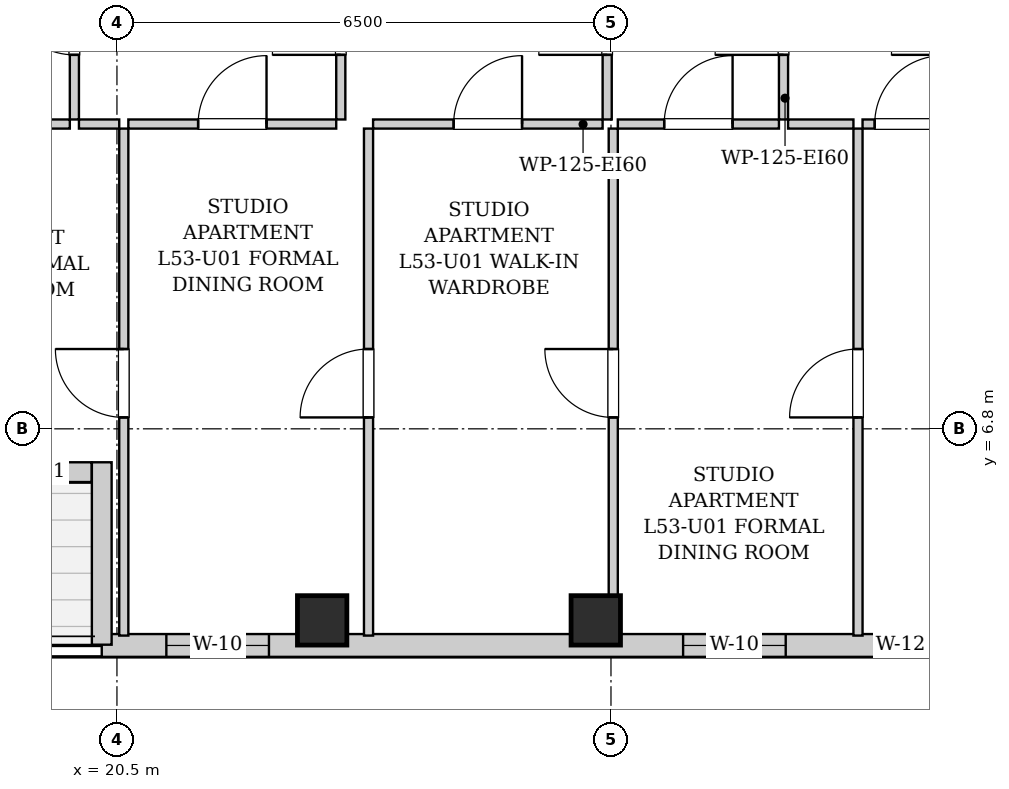
"""IFC4 building model, lengths in metres.
Left out: names, types, materials, properties, quantities, classifications, styles, units other than length and angle.
Written with IfcOpenShell. Run it as: python <this file> out.ifc"""

import sys

from ifc_helpers import new_model, si_unit, direction, frame, frame_2d, origin, origin_2d, place, context, subcontext, project, spatial, rectangle, extrude, element, fill, save


model = new_model("IFC4")
c1 = context("Model", 3, precision=1e-05, world=origin(), true_north=direction((0.0, 1.0)))
c2 = subcontext(c1, "Body", "Model", "MODEL_VIEW")
j1 = project(units=[si_unit("LENGTHUNIT", "METRE"), si_unit("PLANEANGLEUNIT", "RADIAN")], contexts=[c1])
p1 = place(None, origin())
s1 = spatial("IfcSite", under=j1, at=p1, CompositionType="ELEMENT")
p2 = place(p1, origin())
s2 = spatial("IfcBuilding", under=s1, at=p2, CompositionType="ELEMENT")
p3 = place(p2, frame((0.0, 0.0, 184.3)))
s3 = spatial("IfcBuildingStorey", under=s2, at=p3, CompositionType="ELEMENT", Elevation=184.3)
for number, where, z_axis, x_axis in (
    (1, (23.2, 4.28, 0.0), (0.0, 0.0, 1.0), (1.0, 0.0, 0.0)),
    (2, (26.8, 4.28, 0.0), (0.0, 0.0, 1.0), (1.0, 0.0, 0.0)),
):
    element("IfcColumn", number, at=place(p3, frame(where, z_axis=z_axis, x_axis=x_axis)), inside=s3, PredefinedType="COLUMN", context=c2, shape_type="SweptSolid", body=[
        extrude(rectangle(XDim=0.65, YDim=0.65, at=origin_2d()), origin(), (0.0, 0.0, 1.0), 3.3),
    ])
p4 = place(p3, frame((31.5, 3.95, 0.0), z_axis=(0.0, 0.0, 1.0), x_axis=(-1.0, 0.0, 0.0)))
e3 = element("IfcWall", 3, at=p4, inside=s3, PredefinedType="SOLIDWALL", context=c2, shape_type="SweptSolid", body=[
    extrude(rectangle(XDim=11.2, YDim=0.3, at=frame_2d((5.6, 0.0))), origin(), (0.0, 0.0, 1.0), 3.04),
])
p5 = place(p4, frame((9.0, 0.0, 0.55)))
e4 = element("IfcOpeningElement", 4, at=p5, cuts=e3, PredefinedType="OPENING", context=c2, shape_type="SweptSolid", body=[
    extrude(rectangle(XDim=1.35, YDim=1.2, at=frame_2d((0.675, 0.6))), frame((0.0, 0.16, 0.0), z_axis=(0.0, -1.0, 0.0), x_axis=(1.0, 0.0, 0.0)), (0.0, 0.0, 1.0), 0.32),
])
p6 = place(p4, frame((2.201, 0.0, 0.55)))
e5 = element("IfcOpeningElement", 5, at=p6, cuts=e3, PredefinedType="OPENING", context=c2, shape_type="SweptSolid", body=[
    extrude(rectangle(XDim=1.35, YDim=1.2, at=frame_2d((0.675, 0.6))), frame((0.0, 0.16, 0.0), z_axis=(0.0, -1.0, 0.0), x_axis=(1.0, 0.0, 0.0)), (0.0, 0.0, 1.0), 0.32),
])
p7 = place(p4, frame((0.35, 0.0, 0.55)))
e6 = element("IfcOpeningElement", 6, at=p7, cuts=e3, PredefinedType="OPENING", context=c2, shape_type="SweptSolid", body=[
    extrude(rectangle(XDim=0.68, YDim=1.2, at=frame_2d((0.34, 0.6))), frame((0.0, 0.16, 0.0), z_axis=(0.0, -1.0, 0.0), x_axis=(1.0, 0.0, 0.0)), (0.0, 0.0, 1.0), 0.32),
])
p8 = place(p3, frame((20.3, 3.96, 0.0), z_axis=(0.0, 0.0, 1.0), x_axis=(0.0, 1.0, 0.0)))
e7 = element("IfcWall", 7, at=p8, inside=s3, PredefinedType="SOLIDWALL", context=c2, shape_type="SweptSolid", body=[
    extrude(rectangle(XDim=2.4, YDim=0.26, at=frame_2d((1.2, 0.0))), origin(), (0.0, 0.0, 1.0), 3.04),
])
p9 = place(p3, frame((20.166, 6.23, 0.0), z_axis=(0.0, 0.0, 1.0), x_axis=(-1.0, 0.0, 0.0)))
e8 = element("IfcWall", 8, at=p9, inside=s3, PredefinedType="SOLIDWALL", context=c2, shape_type="SweptSolid", body=[
    extrude(rectangle(XDim=4.332, YDim=0.26, at=frame_2d((2.166, 0.0))), origin(), (0.0, 0.0, 1.0), 3.04),
])
p10 = place(p9, frame((1.556, 0.0, 0.0)))
e9 = element("IfcOpeningElement", 9, at=p10, cuts=e8, PredefinedType="OPENING", context=c2, shape_type="SweptSolid", body=[
    extrude(rectangle(XDim=1.1, YDim=2.0, at=frame_2d((0.55, 1.0))), frame((0.0, 0.14, 0.0), z_axis=(0.0, -1.0, 0.0), x_axis=(1.0, 0.0, 0.0)), (0.0, 0.0, 1.0), 0.28),
])
p11 = place(p9, frame((0.546, 0.0, 0.55)))
e10 = element("IfcOpeningElement", 10, at=p11, cuts=e8, PredefinedType="OPENING", context=c2, shape_type="SweptSolid", body=[
    extrude(rectangle(XDim=0.85, YDim=1.2, at=frame_2d((0.425, 0.6))), frame((0.0, 0.14, 0.0), z_axis=(0.0, -1.0, 0.0), x_axis=(1.0, 0.0, 0.0)), (0.0, 0.0, 1.0), 0.28),
])
p12 = place(p3, frame((19.94, 10.87, 0.0), z_axis=(0.0, 0.0, 1.0), x_axis=(0.0, 1.0, 0.0)))
e11 = element("IfcWall", 11, at=p12, inside=s3, PredefinedType="PARTITIONING", context=c2, shape_type="SweptSolid", body=[
    extrude(rectangle(XDim=2.6, YDim=0.12, at=frame_2d((1.3, 0.0))), origin(), (0.0, 0.0, 1.0), 3.04),
])
p13 = place(p12, frame((0.85, 0.0, 0.0)))
e12 = element("IfcOpeningElement", 12, at=p13, cuts=e11, PredefinedType="OPENING", context=c2, shape_type="SweptSolid", body=[
    extrude(rectangle(XDim=0.9, YDim=2.05, at=frame_2d((0.45, 1.025))), frame((0.0, 0.07, 0.0), z_axis=(0.0, -1.0, 0.0), x_axis=(1.0, 0.0, 0.0)), (0.0, 0.0, 1.0), 0.14),
])
p14 = place(p3, frame((17.43, 10.81, 0.0), z_axis=(0.0, 0.0, 1.0), x_axis=(1.0, 0.0, 0.0)))
e13 = element("IfcWall", 13, at=p14, inside=s3, PredefinedType="PARTITIONING", context=c2, shape_type="SweptSolid", body=[
    extrude(rectangle(XDim=2.45, YDim=0.12, at=frame_2d((1.225, 0.0))), origin(), (0.0, 0.0, 1.0), 3.04),
])
p15 = place(p14, frame((0.775, 0.0, 0.0)))
e14 = element("IfcOpeningElement", 14, at=p15, cuts=e13, PredefinedType="OPENING", context=c2, shape_type="SweptSolid", body=[
    extrude(rectangle(XDim=0.9, YDim=2.05, at=frame_2d((0.45, 1.025))), frame((0.0, 0.07, 0.0), z_axis=(0.0, -1.0, 0.0), x_axis=(1.0, 0.0, 0.0)), (0.0, 0.0, 1.0), 0.14),
])
p16 = place(p3, frame((23.445, 10.87, 0.0), z_axis=(0.0, 0.0, 1.0), x_axis=(0.0, 1.0, 0.0)))
e15 = element("IfcWall", 15, at=p16, inside=s3, PredefinedType="PARTITIONING", context=c2, shape_type="SweptSolid", body=[
    extrude(rectangle(XDim=2.6, YDim=0.12, at=frame_2d((1.3, 0.0))), origin(), (0.0, 0.0, 1.0), 3.04),
])
p17 = place(p16, frame((0.85, 0.0, 0.0)))
e16 = element("IfcOpeningElement", 16, at=p17, cuts=e15, PredefinedType="OPENING", context=c2, shape_type="SweptSolid", body=[
    extrude(rectangle(XDim=0.9, YDim=2.05, at=frame_2d((0.45, 1.025))), frame((0.0, 0.07, 0.0), z_axis=(0.0, -1.0, 0.0), x_axis=(1.0, 0.0, 0.0)), (0.0, 0.0, 1.0), 0.14),
])
p18 = place(p3, frame((20.0, 10.81, 0.0), z_axis=(0.0, 0.0, 1.0), x_axis=(1.0, 0.0, 0.0)))
e17 = element("IfcWall", 17, at=p18, inside=s3, PredefinedType="PARTITIONING", context=c2, shape_type="SweptSolid", body=[
    extrude(rectangle(XDim=0.53, YDim=0.12, at=frame_2d((0.265, 0.0))), origin(), (0.0, 0.0, 1.0), 3.04),
])
p19 = place(p3, frame((20.65, 10.81, 0.0), z_axis=(0.0, 0.0, 1.0), x_axis=(1.0, 0.0, 0.0)))
e18 = element("IfcWall", 18, at=p19, inside=s3, PredefinedType="PARTITIONING", context=c2, shape_type="SweptSolid", body=[
    extrude(rectangle(XDim=2.735, YDim=0.12, at=frame_2d((1.368, 0.0))), origin(), (0.0, 0.0, 1.0), 3.04),
])
p20 = place(p19, frame((0.918, 0.0, 0.0)))
e19 = element("IfcOpeningElement", 19, at=p20, cuts=e18, PredefinedType="OPENING", context=c2, shape_type="SweptSolid", body=[
    extrude(rectangle(XDim=0.9, YDim=2.05, at=frame_2d((0.45, 1.025))), frame((0.0, 0.07, 0.0), z_axis=(0.0, -1.0, 0.0), x_axis=(1.0, 0.0, 0.0)), (0.0, 0.0, 1.0), 0.14),
])
p21 = place(p3, frame((26.95, 10.87, 0.0), z_axis=(0.0, 0.0, 1.0), x_axis=(0.0, 1.0, 0.0)))
e20 = element("IfcWall", 20, at=p21, inside=s3, PredefinedType="PARTITIONING", context=c2, shape_type="SweptSolid", body=[
    extrude(rectangle(XDim=2.6, YDim=0.12, at=frame_2d((1.3, 0.0))), origin(), (0.0, 0.0, 1.0), 3.04),
])
p22 = place(p21, frame((0.85, 0.0, 0.0)))
e21 = element("IfcOpeningElement", 21, at=p22, cuts=e20, PredefinedType="OPENING", context=c2, shape_type="SweptSolid", body=[
    extrude(rectangle(XDim=0.9, YDim=2.05, at=frame_2d((0.45, 1.025))), frame((0.0, 0.07, 0.0), z_axis=(0.0, -1.0, 0.0), x_axis=(1.0, 0.0, 0.0)), (0.0, 0.0, 1.0), 0.14),
])
p23 = place(p3, frame((23.87, 10.81, 0.0), z_axis=(0.0, 0.0, 1.0), x_axis=(1.0, 0.0, 0.0)))
e22 = element("IfcWall", 22, at=p23, inside=s3, PredefinedType="PARTITIONING", context=c2, shape_type="SweptSolid", body=[
    extrude(rectangle(XDim=3.02, YDim=0.12, at=frame_2d((1.51, 0.0))), origin(), (0.0, 0.0, 1.0), 3.04),
])
p24 = place(p23, frame((1.06, 0.0, 0.0)))
e23 = element("IfcOpeningElement", 23, at=p24, cuts=e22, PredefinedType="OPENING", context=c2, shape_type="SweptSolid", body=[
    extrude(rectangle(XDim=0.9, YDim=2.05, at=frame_2d((0.45, 1.025))), frame((0.0, 0.07, 0.0), z_axis=(0.0, -1.0, 0.0), x_axis=(1.0, 0.0, 0.0)), (0.0, 0.0, 1.0), 0.14),
])
p25 = place(p3, frame((29.27, 10.87, 0.0), z_axis=(0.0, 0.0, 1.0), x_axis=(0.0, 1.0, 0.0)))
e24 = element("IfcWall", 24, at=p25, inside=s3, PredefinedType="PARTITIONING", context=c2, shape_type="SweptSolid", body=[
    extrude(rectangle(XDim=2.6, YDim=0.12, at=frame_2d((1.3, 0.0))), origin(), (0.0, 0.0, 1.0), 3.04),
])
p26 = place(p25, frame((0.85, 0.0, 0.0)))
e25 = element("IfcOpeningElement", 25, at=p26, cuts=e24, PredefinedType="OPENING", context=c2, shape_type="SweptSolid", body=[
    extrude(rectangle(XDim=0.9, YDim=2.05, at=frame_2d((0.45, 1.025))), frame((0.0, 0.07, 0.0), z_axis=(0.0, -1.0, 0.0), x_axis=(1.0, 0.0, 0.0)), (0.0, 0.0, 1.0), 0.14),
])
p27 = place(p3, frame((27.09, 10.81, 0.0), z_axis=(0.0, 0.0, 1.0), x_axis=(1.0, 0.0, 0.0)))
e26 = element("IfcWall", 26, at=p27, inside=s3, PredefinedType="PARTITIONING", context=c2, shape_type="SweptSolid", body=[
    extrude(rectangle(XDim=2.12, YDim=0.12, at=frame_2d((1.06, 0.0))), origin(), (0.0, 0.0, 1.0), 3.04),
])
p28 = place(p27, frame((0.61, 0.0, 0.0)))
e27 = element("IfcOpeningElement", 27, at=p28, cuts=e26, PredefinedType="OPENING", context=c2, shape_type="SweptSolid", body=[
    extrude(rectangle(XDim=0.9, YDim=2.05, at=frame_2d((0.45, 1.025))), frame((0.0, 0.07, 0.0), z_axis=(0.0, -1.0, 0.0), x_axis=(1.0, 0.0, 0.0)), (0.0, 0.0, 1.0), 0.14),
])
p29 = place(p3, frame((29.33, 10.81, 0.0), z_axis=(0.0, 0.0, 1.0), x_axis=(1.0, 0.0, 0.0)))
e28 = element("IfcWall", 28, at=p29, inside=s3, PredefinedType="PARTITIONING", context=c2, shape_type="SweptSolid", body=[
    extrude(rectangle(XDim=0.86, YDim=0.12, at=frame_2d((0.43, 0.0))), origin(), (0.0, 0.0, 1.0), 3.04),
])
p30 = place(p3, frame((30.31, 10.81, 0.0), z_axis=(0.0, 0.0, 1.0), x_axis=(1.0, 0.0, 0.0)))
e29 = element("IfcWall", 29, at=p30, inside=s3, PredefinedType="PARTITIONING", context=c2, shape_type="SweptSolid", body=[
    extrude(rectangle(XDim=1.22, YDim=0.12, at=frame_2d((0.61, 0.0))), origin(), (0.0, 0.0, 1.0), 3.04),
])
p31 = place(p30, frame((0.16, 0.0, 0.0)))
e30 = element("IfcOpeningElement", 30, at=p31, cuts=e29, PredefinedType="OPENING", context=c2, shape_type="SweptSolid", body=[
    extrude(rectangle(XDim=0.9, YDim=2.05, at=frame_2d((0.45, 1.025))), frame((0.0, 0.07, 0.0), z_axis=(0.0, -1.0, 0.0), x_axis=(1.0, 0.0, 0.0)), (0.0, 0.0, 1.0), 0.14),
])
p32 = place(p3, frame((20.59, 4.08, 0.0), z_axis=(0.0, 0.0, 1.0), x_axis=(0.0, 1.0, 0.0)))
e31 = element("IfcWall", 31, at=p32, inside=s3, PredefinedType="PARTITIONING", context=c2, shape_type="SweptSolid", body=[
    extrude(rectangle(XDim=6.67, YDim=0.12, at=frame_2d((3.335, 0.0))), origin(), (0.0, 0.0, 1.0), 3.04),
])
p33 = place(p32, frame((2.87, 0.0, 0.0)))
e32 = element("IfcOpeningElement", 32, at=p33, cuts=e31, PredefinedType="OPENING", context=c2, shape_type="SweptSolid", body=[
    extrude(rectangle(XDim=0.9, YDim=2.05, at=frame_2d((0.45, 1.025))), frame((0.0, 0.07, 0.0), z_axis=(0.0, -1.0, 0.0), x_axis=(1.0, 0.0, 0.0)), (0.0, 0.0, 1.0), 0.14),
])
p34 = place(p3, frame((23.81, 4.08, 0.0), z_axis=(0.0, 0.0, 1.0), x_axis=(0.0, 1.0, 0.0)))
e33 = element("IfcWall", 33, at=p34, inside=s3, PredefinedType="PARTITIONING", context=c2, shape_type="SweptSolid", body=[
    extrude(rectangle(XDim=6.67, YDim=0.12, at=frame_2d((3.335, 0.0))), origin(), (0.0, 0.0, 1.0), 3.04),
])
p35 = place(p34, frame((2.87, 0.0, 0.0)))
e34 = element("IfcOpeningElement", 34, at=p35, cuts=e33, PredefinedType="OPENING", context=c2, shape_type="SweptSolid", body=[
    extrude(rectangle(XDim=0.9, YDim=2.05, at=frame_2d((0.45, 1.025))), frame((0.0, 0.07, 0.0), z_axis=(0.0, -1.0, 0.0), x_axis=(1.0, 0.0, 0.0)), (0.0, 0.0, 1.0), 0.14),
])
p36 = place(p3, frame((27.03, 4.08, 0.0), z_axis=(0.0, 0.0, 1.0), x_axis=(0.0, 1.0, 0.0)))
e35 = element("IfcWall", 35, at=p36, inside=s3, PredefinedType="PARTITIONING", context=c2, shape_type="SweptSolid", body=[
    extrude(rectangle(XDim=6.67, YDim=0.12, at=frame_2d((3.335, 0.0))), origin(), (0.0, 0.0, 1.0), 3.04),
])
p37 = place(p36, frame((2.87, 0.0, 0.0)))
e36 = element("IfcOpeningElement", 36, at=p37, cuts=e35, PredefinedType="OPENING", context=c2, shape_type="SweptSolid", body=[
    extrude(rectangle(XDim=0.9, YDim=2.05, at=frame_2d((0.45, 1.025))), frame((0.0, 0.07, 0.0), z_axis=(0.0, -1.0, 0.0), x_axis=(1.0, 0.0, 0.0)), (0.0, 0.0, 1.0), 0.14),
])
p38 = place(p3, frame((30.25, 4.08, 0.0), z_axis=(0.0, 0.0, 1.0), x_axis=(0.0, 1.0, 0.0)))
e37 = element("IfcWall", 37, at=p38, inside=s3, PredefinedType="PARTITIONING", context=c2, shape_type="SweptSolid", body=[
    extrude(rectangle(XDim=6.67, YDim=0.12, at=frame_2d((3.335, 0.0))), origin(), (0.0, 0.0, 1.0), 3.04),
])
p39 = place(p38, frame((2.87, 0.0, 0.0)))
e38 = element("IfcOpeningElement", 38, at=p39, cuts=e37, PredefinedType="OPENING", context=c2, shape_type="SweptSolid", body=[
    extrude(rectangle(XDim=0.9, YDim=2.05, at=frame_2d((0.45, 1.025))), frame((0.0, 0.07, 0.0), z_axis=(0.0, -1.0, 0.0), x_axis=(1.0, 0.0, 0.0)), (0.0, 0.0, 1.0), 0.14),
])
p40 = place(p13, origin())
e39 = element("IfcDoor", 39, at=p40, inside=s3, OperationType="SINGLE_SWING_RIGHT", PredefinedType="DOOR", context=c2, shape_type="SweptSolid", body=[
    extrude(rectangle(XDim=0.9, YDim=2.05, at=frame_2d((0.45, 1.025))), frame((0.0, 0.025, 0.0), z_axis=(0.0, -1.0, 0.0), x_axis=(1.0, 0.0, 0.0)), (0.0, 0.0, 1.0), 0.05),
])
fill(e12, e39)
p41 = place(p17, origin())
e40 = element("IfcDoor", 40, at=p41, inside=s3, OperationType="SINGLE_SWING_LEFT", PredefinedType="DOOR", context=c2, shape_type="SweptSolid", body=[
    extrude(rectangle(XDim=0.9, YDim=2.05, at=frame_2d((0.45, 1.025))), frame((0.0, 0.025, 0.0), z_axis=(0.0, -1.0, 0.0), x_axis=(1.0, 0.0, 0.0)), (0.0, 0.0, 1.0), 0.05),
])
fill(e16, e40)
p42 = place(p20, origin())
e41 = element("IfcDoor", 41, at=p42, inside=s3, OperationType="SINGLE_SWING_RIGHT", PredefinedType="DOOR", context=c2, shape_type="SweptSolid", body=[
    extrude(rectangle(XDim=0.9, YDim=2.05, at=frame_2d((0.45, 1.025))), frame((0.0, 0.025, 0.0), z_axis=(0.0, -1.0, 0.0), x_axis=(1.0, 0.0, 0.0)), (0.0, 0.0, 1.0), 0.05),
])
fill(e19, e41)
p43 = place(p22, origin())
e42 = element("IfcDoor", 42, at=p43, inside=s3, OperationType="SINGLE_SWING_LEFT", PredefinedType="DOOR", context=c2, shape_type="SweptSolid", body=[
    extrude(rectangle(XDim=0.9, YDim=2.05, at=frame_2d((0.45, 1.025))), frame((0.0, 0.025, 0.0), z_axis=(0.0, -1.0, 0.0), x_axis=(1.0, 0.0, 0.0)), (0.0, 0.0, 1.0), 0.05),
])
fill(e21, e42)
p44 = place(p24, origin())
e43 = element("IfcDoor", 43, at=p44, inside=s3, OperationType="SINGLE_SWING_RIGHT", PredefinedType="DOOR", context=c2, shape_type="SweptSolid", body=[
    extrude(rectangle(XDim=0.9, YDim=2.05, at=frame_2d((0.45, 1.025))), frame((0.0, 0.025, 0.0), z_axis=(0.0, -1.0, 0.0), x_axis=(1.0, 0.0, 0.0)), (0.0, 0.0, 1.0), 0.05),
])
fill(e23, e43)
p45 = place(p26, origin())
e44 = element("IfcDoor", 44, at=p45, inside=s3, OperationType="SINGLE_SWING_LEFT", PredefinedType="DOOR", context=c2, shape_type="SweptSolid", body=[
    extrude(rectangle(XDim=0.9, YDim=2.05, at=frame_2d((0.45, 1.025))), frame((0.0, 0.025, 0.0), z_axis=(0.0, -1.0, 0.0), x_axis=(1.0, 0.0, 0.0)), (0.0, 0.0, 1.0), 0.05),
])
fill(e25, e44)
p46 = place(p28, origin())
e45 = element("IfcDoor", 45, at=p46, inside=s3, OperationType="SINGLE_SWING_RIGHT", PredefinedType="DOOR", context=c2, shape_type="SweptSolid", body=[
    extrude(rectangle(XDim=0.9, YDim=2.05, at=frame_2d((0.45, 1.025))), frame((0.0, 0.025, 0.0), z_axis=(0.0, -1.0, 0.0), x_axis=(1.0, 0.0, 0.0)), (0.0, 0.0, 1.0), 0.05),
])
fill(e27, e45)
p47 = place(p31, origin())
e46 = element("IfcDoor", 46, at=p47, inside=s3, OperationType="SINGLE_SWING_RIGHT", PredefinedType="DOOR", context=c2, shape_type="SweptSolid", body=[
    extrude(rectangle(XDim=0.9, YDim=2.05, at=frame_2d((0.45, 1.025))), frame((0.0, 0.025, 0.0), z_axis=(0.0, -1.0, 0.0), x_axis=(1.0, 0.0, 0.0)), (0.0, 0.0, 1.0), 0.05),
])
fill(e30, e46)
p48 = place(p33, origin())
e47 = element("IfcDoor", 47, at=p48, inside=s3, OperationType="SINGLE_SWING_RIGHT", PredefinedType="DOOR", context=c2, shape_type="SweptSolid", body=[
    extrude(rectangle(XDim=0.9, YDim=2.05, at=frame_2d((0.45, 1.025))), frame((0.0, 0.025, 0.0), z_axis=(0.0, -1.0, 0.0), x_axis=(1.0, 0.0, 0.0)), (0.0, 0.0, 1.0), 0.05),
])
fill(e32, e47)
p49 = place(p35, origin())
e48 = element("IfcDoor", 48, at=p49, inside=s3, OperationType="SINGLE_SWING_LEFT", PredefinedType="DOOR", context=c2, shape_type="SweptSolid", body=[
    extrude(rectangle(XDim=0.9, YDim=2.05, at=frame_2d((0.45, 1.025))), frame((0.0, 0.025, 0.0), z_axis=(0.0, -1.0, 0.0), x_axis=(1.0, 0.0, 0.0)), (0.0, 0.0, 1.0), 0.05),
])
fill(e34, e48)
p50 = place(p37, origin())
e49 = element("IfcDoor", 49, at=p50, inside=s3, OperationType="SINGLE_SWING_RIGHT", PredefinedType="DOOR", context=c2, shape_type="SweptSolid", body=[
    extrude(rectangle(XDim=0.9, YDim=2.05, at=frame_2d((0.45, 1.025))), frame((0.0, 0.025, 0.0), z_axis=(0.0, -1.0, 0.0), x_axis=(1.0, 0.0, 0.0)), (0.0, 0.0, 1.0), 0.05),
])
fill(e36, e49)
p51 = place(p39, origin())
e50 = element("IfcDoor", 50, at=p51, inside=s3, OperationType="SINGLE_SWING_LEFT", PredefinedType="DOOR", context=c2, shape_type="SweptSolid", body=[
    extrude(rectangle(XDim=0.9, YDim=2.05, at=frame_2d((0.45, 1.025))), frame((0.0, 0.025, 0.0), z_axis=(0.0, -1.0, 0.0), x_axis=(1.0, 0.0, 0.0)), (0.0, 0.0, 1.0), 0.05),
])
fill(e38, e50)
p52 = place(p5, origin())
e51 = element("IfcWindow", 51, at=p52, inside=s3, PartitioningType="SINGLE_PANEL", PredefinedType="WINDOW", context=c2, shape_type="SweptSolid", body=[
    extrude(rectangle(XDim=1.35, YDim=1.2, at=frame_2d((0.675, 0.6))), frame((0.0, 0.03, 0.0), z_axis=(0.0, -1.0, 0.0), x_axis=(1.0, 0.0, 0.0)), (0.0, 0.0, 1.0), 0.06),
])
fill(e4, e51)
p53 = place(p6, origin())
e52 = element("IfcWindow", 52, at=p53, inside=s3, PartitioningType="SINGLE_PANEL", PredefinedType="WINDOW", context=c2, shape_type="SweptSolid", body=[
    extrude(rectangle(XDim=1.35, YDim=1.2, at=frame_2d((0.675, 0.6))), frame((0.0, 0.03, 0.0), z_axis=(0.0, -1.0, 0.0), x_axis=(1.0, 0.0, 0.0)), (0.0, 0.0, 1.0), 0.06),
])
fill(e5, e52)
p54 = place(p7, origin())
e53 = element("IfcWindow", 53, at=p54, inside=s3, PartitioningType="SINGLE_PANEL", PredefinedType="WINDOW", context=c2, shape_type="SweptSolid", body=[
    extrude(rectangle(XDim=0.68, YDim=1.2, at=frame_2d((0.34, 0.6))), frame((0.0, 0.03, 0.0), z_axis=(0.0, -1.0, 0.0), x_axis=(1.0, 0.0, 0.0)), (0.0, 0.0, 1.0), 0.06),
])
fill(e6, e53)
save(model, sys.argv[1])
